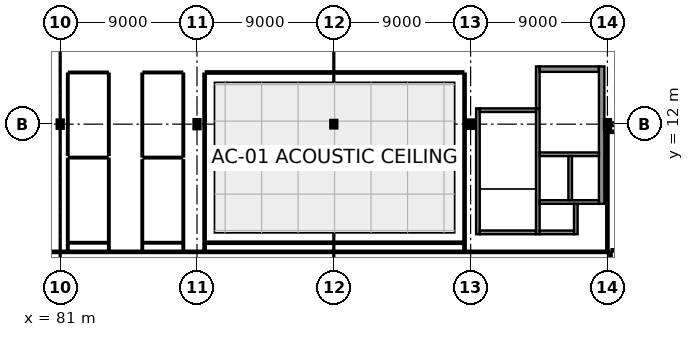
"""IFC4 building model, lengths in metres.
Left out: names, types, materials, properties, quantities, classifications, styles, units other than length and angle.
Written with IfcOpenShell. Run it as: python <this file> out.ifc"""

import sys

from ifc_helpers import new_model, si_unit, direction, frame, frame_2d, origin, origin_2d, place, context, subcontext, project, spatial, rectangle, i_section, extrude, element, fill, save


model = new_model("IFC4")
c1 = context("Model", 3, precision=1e-05, world=origin(), true_north=direction((0.0, 1.0)))
c2 = subcontext(c1, "Body", "Model", "MODEL_VIEW")
j1 = project(units=[si_unit("LENGTHUNIT", "METRE"), si_unit("PLANEANGLEUNIT", "RADIAN")], contexts=[c1])
p1 = place(None, origin())
s1 = spatial("IfcSite", under=j1, at=p1, CompositionType="ELEMENT")
p2 = place(p1, origin())
s2 = spatial("IfcBuilding", under=s1, at=p2, CompositionType="ELEMENT")
p3 = place(p2, frame((0.0, 0.0, 5.4)))
s3 = spatial("IfcBuildingStorey", under=s2, at=p3, CompositionType="ELEMENT", Elevation=5.4)
p4 = place(p3, frame((81.0, 12.0, 0.0), z_axis=(0.0, 0.0, 1.0), x_axis=(1.0, 0.0, 0.0)))
e1 = element("IfcColumn", 1, at=p4, inside=s3, PredefinedType="COLUMN", context=c2, shape_type="SweptSolid", body=[
    extrude(i_section(OverallWidth=0.3, OverallDepth=0.45, WebThickness=0.014, FlangeThickness=0.026, at=origin_2d()), origin(), (0.0, 0.0, 1.0), 4.5),
])
p5 = place(p3, frame((90.0, 12.0, 0.0), z_axis=(0.0, 0.0, 1.0), x_axis=(1.0, 0.0, 0.0)))
e2 = element("IfcColumn", 2, at=p5, inside=s3, PredefinedType="COLUMN", context=c2, shape_type="SweptSolid", body=[
    extrude(i_section(OverallWidth=0.3, OverallDepth=0.5, WebThickness=0.014, FlangeThickness=0.028, at=origin_2d()), origin(), (0.0, 0.0, 1.0), 4.5),
])
p6 = place(p3, frame((99.0, 12.0, 0.0), z_axis=(0.0, 0.0, 1.0), x_axis=(1.0, 0.0, 0.0)))
e3 = element("IfcColumn", 3, at=p6, inside=s3, PredefinedType="COLUMN", context=c2, shape_type="SweptSolid", body=[
    extrude(i_section(OverallWidth=0.3, OverallDepth=0.4, WebThickness=0.013, FlangeThickness=0.024, at=origin_2d()), origin(), (0.0, 0.0, 1.0), 4.5),
])
p7 = place(p3, frame((108.0, 12.0, 0.0), z_axis=(0.0, 0.0, 1.0), x_axis=(1.0, 0.0, 0.0)))
e4 = element("IfcColumn", 4, at=p7, inside=s3, PredefinedType="COLUMN", context=c2, shape_type="SweptSolid", body=[
    extrude(i_section(OverallWidth=0.3, OverallDepth=0.45, WebThickness=0.014, FlangeThickness=0.026, at=origin_2d()), origin(), (0.0, 0.0, 1.0), 4.5),
])
p8 = place(p3, frame((117.0, 12.0, 0.0), z_axis=(0.0, 0.0, 1.0), x_axis=(0.0, 1.0, 0.0)))
e5 = element("IfcColumn", 5, at=p8, inside=s3, PredefinedType="COLUMN", context=c2, shape_type="SweptSolid", body=[
    extrude(i_section(OverallWidth=0.3, OverallDepth=0.5, WebThickness=0.014, FlangeThickness=0.028, at=origin_2d()), origin(), (0.0, 0.0, 1.0), 4.5),
])
p9 = place(p3, frame((108.48, 4.76, 0.0), z_axis=(0.0, 0.0, 1.0), x_axis=(0.0, 1.0, 0.0)))
e6 = element("IfcWall", 6, at=p9, inside=s3, PredefinedType="SHEAR", context=c2, shape_type="SweptSolid", body=[
    extrude(rectangle(XDim=8.28, YDim=0.24, at=frame_2d((4.14, 0.0))), origin(), (0.0, 0.0, 1.0), 4.31),
])
p10 = place(p3, frame((112.42, 4.76, 0.0), z_axis=(0.0, 0.0, 1.0), x_axis=(0.0, 1.0, 0.0)))
e7 = element("IfcWall", 7, at=p10, inside=s3, PredefinedType="SHEAR", context=c2, shape_type="SweptSolid", body=[
    extrude(rectangle(XDim=8.28, YDim=0.24, at=frame_2d((4.14, 0.0))), origin(), (0.0, 0.0, 1.0), 4.31),
])
p11 = place(p10, frame((6.49, 0.0, 0.0)))
e8 = element("IfcOpeningElement", 8, at=p11, cuts=e7, PredefinedType="OPENING", context=c2, shape_type="SweptSolid", body=[
    extrude(rectangle(XDim=1.3, YDim=2.2, at=frame_2d((0.65, 1.1))), frame((0.0, 0.135, 0.0), z_axis=(0.0, -1.0, 0.0), x_axis=(1.0, 0.0, 0.0)), (0.0, 0.0, 1.0), 0.27),
])
for number, where, z_axis, x_axis in (
    (9, (108.6, 4.88, 0.0), (0.0, 0.0, 1.0), (1.0, 0.0, 0.0)),
    (10, (108.6, 12.92, 0.0), (0.0, 0.0, 1.0), (1.0, 0.0, 0.0)),
):
    element("IfcWall", number, at=place(p3, frame(where, z_axis=z_axis, x_axis=x_axis)), inside=s3, PredefinedType="SHEAR", context=c2, shape_type="SweptSolid", body=[
        extrude(rectangle(XDim=3.7, YDim=0.24, at=frame_2d((1.85, 0.0))), origin(), (0.0, 0.0, 1.0), 4.31),
    ])
p12 = place(p3, frame((112.42, 13.04, 0.0), z_axis=(0.0, 0.0, 1.0), x_axis=(0.0, 1.0, 0.0)))
e11 = element("IfcWall", 11, at=p12, inside=s3, PredefinedType="SHEAR", context=c2, shape_type="SweptSolid", body=[
    extrude(rectangle(XDim=2.76, YDim=0.24, at=frame_2d((1.38, 0.0))), origin(), (0.0, 0.0, 1.0), 4.16),
])
p13 = place(p3, frame((112.54, 15.62, 0.0), z_axis=(0.0, 0.0, 1.0), x_axis=(1.0, 0.0, 0.0)))
e12 = element("IfcWall", 12, at=p13, inside=s3, PredefinedType="SHEAR", context=c2, shape_type="SweptSolid", body=[
    extrude(rectangle(XDim=3.9, YDim=0.36, at=frame_2d((1.95, 0.0))), origin(), (0.0, 0.0, 1.0), 4.16),
])
p14 = place(p13, frame((1.15, 0.0, 0.0)))
e13 = element("IfcOpeningElement", 13, at=p14, cuts=e12, PredefinedType="OPENING", context=c2, shape_type="SweptSolid", body=[
    extrude(rectangle(XDim=1.6, YDim=2.25, at=frame_2d((0.8, 1.125))), frame((0.0, 0.195, 0.0), z_axis=(0.0, -1.0, 0.0), x_axis=(1.0, 0.0, 0.0)), (0.0, 0.0, 1.0), 0.39),
])
p15 = place(p3, frame((116.62, 6.76, 0.0), z_axis=(0.0, 0.0, 1.0), x_axis=(0.0, 1.0, 0.0)))
e14 = element("IfcWall", 14, at=p15, inside=s3, PredefinedType="SHEAR", context=c2, shape_type="SweptSolid", body=[
    extrude(rectangle(XDim=9.04, YDim=0.36, at=frame_2d((4.52, 0.0))), origin(), (0.0, 0.0, 1.0), 4.16),
])
p16 = place(p3, frame((112.54, 10.02, 0.0), z_axis=(0.0, 0.0, 1.0), x_axis=(1.0, 0.0, 0.0)))
e15 = element("IfcWall", 15, at=p16, inside=s3, PredefinedType="SHEAR", context=c2, shape_type="SweptSolid", body=[
    extrude(rectangle(XDim=3.9, YDim=0.24, at=frame_2d((1.95, 0.0))), origin(), (0.0, 0.0, 1.0), 4.31),
])
p17 = place(p16, frame((0.235, 0.0, 0.0)))
e16 = element("IfcOpeningElement", 16, at=p17, cuts=e15, PredefinedType="OPENING", context=c2, shape_type="SweptSolid", body=[
    extrude(rectangle(XDim=1.6, YDim=2.3, at=frame_2d((0.8, 1.15))), frame((0.0, 0.135, 0.0), z_axis=(0.0, -1.0, 0.0), x_axis=(1.0, 0.0, 0.0)), (0.0, 0.0, 1.0), 0.27),
])
p18 = place(p16, frame((2.185, 0.0, 0.0)))
e17 = element("IfcOpeningElement", 17, at=p18, cuts=e15, PredefinedType="OPENING", context=c2, shape_type="SweptSolid", body=[
    extrude(rectangle(XDim=1.6, YDim=2.3, at=frame_2d((0.8, 1.15))), frame((0.0, 0.135, 0.0), z_axis=(0.0, -1.0, 0.0), x_axis=(1.0, 0.0, 0.0)), (0.0, 0.0, 1.0), 0.27),
])
p19 = place(p3, frame((112.54, 6.88, 0.0), z_axis=(0.0, 0.0, 1.0), x_axis=(1.0, 0.0, 0.0)))
e18 = element("IfcWall", 18, at=p19, inside=s3, PredefinedType="SHEAR", context=c2, shape_type="SweptSolid", body=[
    extrude(rectangle(XDim=3.9, YDim=0.24, at=frame_2d((1.95, 0.0))), origin(), (0.0, 0.0, 1.0), 4.31),
])
p20 = place(p3, frame((114.55, 7.0, 0.0), z_axis=(0.0, 0.0, 1.0), x_axis=(0.0, 1.0, 0.0)))
e19 = element("IfcWall", 19, at=p20, inside=s3, PredefinedType="SHEAR", context=c2, shape_type="SweptSolid", body=[
    extrude(rectangle(XDim=2.9, YDim=0.24, at=frame_2d((1.45, 0.0))), origin(), (0.0, 0.0, 1.0), 4.31),
])
p21 = place(p3, frame((114.92, 4.76, 0.0), z_axis=(0.0, 0.0, 1.0), x_axis=(0.0, 1.0, 0.0)))
e20 = element("IfcWall", 20, at=p21, inside=s3, PredefinedType="SHEAR", context=c2, shape_type="SweptSolid", body=[
    extrude(rectangle(XDim=2.0, YDim=0.24, at=frame_2d((1.0, 0.0))), origin(), (0.0, 0.0, 1.0), 4.31),
])
p22 = place(p3, frame((112.54, 4.88, 0.0), z_axis=(0.0, 0.0, 1.0), x_axis=(1.0, 0.0, 0.0)))
e21 = element("IfcWall", 21, at=p22, inside=s3, PredefinedType="SHEAR", context=c2, shape_type="SweptSolid", body=[
    extrude(rectangle(XDim=2.26, YDim=0.24, at=frame_2d((1.13, 0.0))), origin(), (0.0, 0.0, 1.0), 4.31),
])
p23 = place(p3, frame((117.248, 12.0, 0.0), z_axis=(0.0, 0.0, 1.0), x_axis=(1.0, 0.0, 0.0)))
e22 = element("IfcWall", 22, at=p23, inside=s3, PredefinedType="SHEAR", context=c2, shape_type="SweptSolid", body=[
    extrude(rectangle(XDim=8.744, YDim=0.24, at=frame_2d((4.372, 0.0))), origin(), (0.0, 0.0, 1.0), 3.585),
])
p24 = place(p3, frame((46.08, 3.6, 0.0), z_axis=(0.0, 0.0, 1.0), x_axis=(1.0, 0.0, 0.0)))
e23 = element("IfcWall", 23, at=p24, inside=s3, PredefinedType="PARTITIONING", context=c2, shape_type="SweptSolid", body=[
    extrude(rectangle(XDim=71.04, YDim=0.15, at=frame_2d((35.52, 0.0))), origin(), (0.0, 0.0, 1.0), 4.14),
])
p25 = place(p24, frame((31.995, 0.0, 0.0)))
e24 = element("IfcOpeningElement", 24, at=p25, cuts=e23, PredefinedType="OPENING", context=c2, shape_type="SweptSolid", body=[
    extrude(rectangle(XDim=1.05, YDim=2.25, at=frame_2d((0.525, 1.125))), frame((0.0, 0.09, 0.0), z_axis=(0.0, -1.0, 0.0), x_axis=(1.0, 0.0, 0.0)), (0.0, 0.0, 1.0), 0.18),
])
p26 = place(p24, frame((68.39, 0.0, 1.05)))
e25 = element("IfcOpeningElement", 25, at=p26, cuts=e23, PredefinedType="OPENING", context=c2, shape_type="SweptSolid", body=[
    extrude(rectangle(XDim=1.8, YDim=1.1, at=frame_2d((0.9, 0.55))), frame((0.0, 0.09, 0.0), z_axis=(0.0, -1.0, 0.0), x_axis=(1.0, 0.0, 0.0)), (0.0, 0.0, 1.0), 0.18),
])
p27 = place(p3, frame((117.2, 3.52, 0.0), z_axis=(0.0, 0.0, 1.0), x_axis=(0.0, -1.0, 0.0)))
e26 = element("IfcWall", 26, at=p27, inside=s3, PredefinedType="PARTITIONING", context=c2, shape_type="SweptSolid", body=[
    extrude(rectangle(XDim=3.297, YDim=0.15, at=frame_2d((1.648, 0.0))), origin(), (0.0, 0.0, 1.0), 3.685),
])
p28 = place(p3, frame((134.855, 3.7, 0.0), z_axis=(0.0, 0.0, 1.0), x_axis=(-1.0, 0.0, 0.0)))
e27 = element("IfcWall", 27, at=p28, inside=s3, PredefinedType="PARTITIONING", context=c2, shape_type="SweptSolid", body=[
    extrude(rectangle(XDim=17.575, YDim=0.15, at=frame_2d((8.788, 0.0))), origin(), (0.0, 0.0, 1.0), 4.14),
])
p29 = place(p3, frame((117.0, 3.67, 0.0), z_axis=(0.0, 0.0, 1.0), x_axis=(0.0, 1.0, 0.0)))
e28 = element("IfcWall", 28, at=p29, inside=s3, PredefinedType="PARTITIONING", context=c2, shape_type="SweptSolid", body=[
    extrude(rectangle(XDim=7.75, YDim=0.15, at=frame_2d((3.875, 0.0))), origin(), (0.0, 0.0, 1.0), 3.685),
])
p30 = place(p3, frame((116.795, 11.5, 0.0), z_axis=(0.0, 0.0, 1.0), x_axis=(1.0, 0.0, 0.0)))
e29 = element("IfcWall", 29, at=p30, inside=s3, PredefinedType="PARTITIONING", context=c2, shape_type="SweptSolid", body=[
    extrude(rectangle(XDim=9.425, YDim=0.15, at=frame_2d((4.712, 0.0))), origin(), (0.0, 0.0, 1.0), 4.14),
])
p31 = place(p3, frame((84.2, 9.72, 0.0), z_axis=(0.0, 0.0, 1.0), x_axis=(0.0, -1.0, 0.0)))
e30 = element("IfcWall", 30, at=p31, inside=s3, PredefinedType="PARTITIONING", context=c2, shape_type="SweptSolid", body=[
    extrude(rectangle(XDim=6.05, YDim=0.1, at=frame_2d((3.025, 0.0))), origin(), (0.0, 0.0, 1.0), 4.14),
])
p32 = place(p31, frame((2.529, 0.0, 0.0)))
e31 = element("IfcOpeningElement", 31, at=p32, cuts=e30, PredefinedType="OPENING", context=c2, shape_type="SweptSolid", body=[
    extrude(rectangle(XDim=0.9, YDim=2.05, at=frame_2d((0.45, 1.025))), frame((0.0, 0.065, 0.0), z_axis=(0.0, -1.0, 0.0), x_axis=(1.0, 0.0, 0.0)), (0.0, 0.0, 1.0), 0.13),
])
p33 = place(p3, frame((84.155, 4.2, 0.0), z_axis=(0.0, 0.0, 1.0), x_axis=(-1.0, 0.0, 0.0)))
e32 = element("IfcWall", 32, at=p33, inside=s3, PredefinedType="PARTITIONING", context=c2, shape_type="SweptSolid", body=[
    extrude(rectangle(XDim=2.575, YDim=0.1, at=frame_2d((1.288, 0.0))), origin(), (0.0, 0.0, 1.0), 4.14),
])
p34 = place(p3, frame((81.5, 3.67, 0.0), z_axis=(0.0, 0.0, 1.0), x_axis=(0.0, 1.0, 0.0)))
e33 = element("IfcWall", 33, at=p34, inside=s3, PredefinedType="PARTITIONING", context=c2, shape_type="SweptSolid", body=[
    extrude(rectangle(XDim=6.05, YDim=0.1, at=frame_2d((3.025, 0.0))), origin(), (0.0, 0.0, 1.0), 3.695),
])
p35 = place(p3, frame((81.58, 9.8, 0.0), z_axis=(0.0, 0.0, 1.0), x_axis=(1.0, 0.0, 0.0)))
e34 = element("IfcWall", 34, at=p35, inside=s3, PredefinedType="PARTITIONING", context=c2, shape_type="SweptSolid", body=[
    extrude(rectangle(XDim=2.54, YDim=0.1, at=frame_2d((1.27, 0.0))), origin(), (0.0, 0.0, 1.0), 4.14),
])
p36 = place(p3, frame((81.5, 9.98, 0.0), z_axis=(0.0, 0.0, 1.0), x_axis=(0.0, 1.0, 0.0)))
e35 = element("IfcWall", 35, at=p36, inside=s3, PredefinedType="PARTITIONING", context=c2, shape_type="SweptSolid", body=[
    extrude(rectangle(XDim=5.34, YDim=0.1, at=frame_2d((2.67, 0.0))), origin(), (0.0, 0.0, 1.0), 3.695),
])
p37 = place(p3, frame((81.58, 15.4, 0.0), z_axis=(0.0, 0.0, 1.0), x_axis=(1.0, 0.0, 0.0)))
e36 = element("IfcWall", 36, at=p37, inside=s3, PredefinedType="PARTITIONING", context=c2, shape_type="SweptSolid", body=[
    extrude(rectangle(XDim=2.54, YDim=0.1, at=frame_2d((1.27, 0.0))), origin(), (0.0, 0.0, 1.0), 4.14),
])
p38 = place(p3, frame((84.2, 15.32, 0.0), z_axis=(0.0, 0.0, 1.0), x_axis=(0.0, -1.0, 0.0)))
e37 = element("IfcWall", 37, at=p38, inside=s3, PredefinedType="PARTITIONING", context=c2, shape_type="SweptSolid", body=[
    extrude(rectangle(XDim=5.34, YDim=0.1, at=frame_2d((2.67, 0.0))), origin(), (0.0, 0.0, 1.0), 4.14),
])
p39 = place(p38, frame((2.22, 0.0, 0.0)))
e38 = element("IfcOpeningElement", 38, at=p39, cuts=e37, PredefinedType="OPENING", context=c2, shape_type="SweptSolid", body=[
    extrude(rectangle(XDim=0.9, YDim=2.05, at=frame_2d((0.45, 1.025))), frame((0.0, 0.065, 0.0), z_axis=(0.0, -1.0, 0.0), x_axis=(1.0, 0.0, 0.0)), (0.0, 0.0, 1.0), 0.13),
])
p40 = place(p3, frame((86.4, 9.88, 0.0), z_axis=(0.0, 0.0, 1.0), x_axis=(0.0, 1.0, 0.0)))
e39 = element("IfcWall", 39, at=p40, inside=s3, PredefinedType="PARTITIONING", context=c2, shape_type="SweptSolid", body=[
    extrude(rectangle(XDim=5.44, YDim=0.1, at=frame_2d((2.72, 0.0))), origin(), (0.0, 0.0, 1.0), 4.14),
])
p41 = place(p40, frame((2.22, 0.0, 0.0)))
e40 = element("IfcOpeningElement", 40, at=p41, cuts=e39, PredefinedType="OPENING", context=c2, shape_type="SweptSolid", body=[
    extrude(rectangle(XDim=1.0, YDim=2.1, at=frame_2d((0.5, 1.05))), frame((0.0, 0.065, 0.0), z_axis=(0.0, -1.0, 0.0), x_axis=(1.0, 0.0, 0.0)), (0.0, 0.0, 1.0), 0.13),
])
p42 = place(p3, frame((86.48, 15.4, 0.0), z_axis=(0.0, 0.0, 1.0), x_axis=(1.0, 0.0, 0.0)))
e41 = element("IfcWall", 41, at=p42, inside=s3, PredefinedType="PARTITIONING", context=c2, shape_type="SweptSolid", body=[
    extrude(rectangle(XDim=2.54, YDim=0.1, at=frame_2d((1.27, 0.0))), origin(), (0.0, 0.0, 1.0), 4.14),
])
p43 = place(p3, frame((89.1, 15.32, 0.0), z_axis=(0.0, 0.0, 1.0), x_axis=(0.0, -1.0, 0.0)))
e42 = element("IfcWall", 42, at=p43, inside=s3, PredefinedType="PARTITIONING", context=c2, shape_type="SweptSolid", body=[
    extrude(rectangle(XDim=5.44, YDim=0.1, at=frame_2d((2.72, 0.0))), origin(), (0.0, 0.0, 1.0), 4.14),
])
p44 = place(p3, frame((89.02, 9.8, 0.0), z_axis=(0.0, 0.0, 1.0), x_axis=(-1.0, 0.0, 0.0)))
e43 = element("IfcWall", 43, at=p44, inside=s3, PredefinedType="PARTITIONING", context=c2, shape_type="SweptSolid", body=[
    extrude(rectangle(XDim=2.54, YDim=0.1, at=frame_2d((1.27, 0.0))), origin(), (0.0, 0.0, 1.0), 4.14),
])
p45 = place(p3, frame((89.1, 9.62, 0.0), z_axis=(0.0, 0.0, 1.0), x_axis=(0.0, -1.0, 0.0)))
e44 = element("IfcWall", 44, at=p45, inside=s3, PredefinedType="PARTITIONING", context=c2, shape_type="SweptSolid", body=[
    extrude(rectangle(XDim=5.95, YDim=0.1, at=frame_2d((2.975, 0.0))), origin(), (0.0, 0.0, 1.0), 4.14),
])
p46 = place(p3, frame((89.055, 4.2, 0.0), z_axis=(0.0, 0.0, 1.0), x_axis=(-1.0, 0.0, 0.0)))
e45 = element("IfcWall", 45, at=p46, inside=s3, PredefinedType="PARTITIONING", context=c2, shape_type="SweptSolid", body=[
    extrude(rectangle(XDim=2.575, YDim=0.1, at=frame_2d((1.288, 0.0))), origin(), (0.0, 0.0, 1.0), 4.14),
])
p47 = place(p3, frame((86.4, 3.67, 0.0), z_axis=(0.0, 0.0, 1.0), x_axis=(0.0, 1.0, 0.0)))
e46 = element("IfcWall", 46, at=p47, inside=s3, PredefinedType="PARTITIONING", context=c2, shape_type="SweptSolid", body=[
    extrude(rectangle(XDim=5.95, YDim=0.1, at=frame_2d((2.975, 0.0))), origin(), (0.0, 0.0, 1.0), 4.14),
])
p48 = place(p47, frame((2.571, 0.0, 0.0)))
e47 = element("IfcOpeningElement", 47, at=p48, cuts=e46, PredefinedType="OPENING", context=c2, shape_type="SweptSolid", body=[
    extrude(rectangle(XDim=0.9, YDim=2.05, at=frame_2d((0.45, 1.025))), frame((0.0, 0.065, 0.0), z_axis=(0.0, -1.0, 0.0), x_axis=(1.0, 0.0, 0.0)), (0.0, 0.0, 1.0), 0.13),
])
p49 = place(p3, frame((107.6, 15.32, 0.0), z_axis=(0.0, 0.0, 1.0), x_axis=(0.0, -1.0, 0.0)))
e48 = element("IfcWall", 48, at=p49, inside=s3, PredefinedType="PARTITIONING", context=c2, shape_type="SweptSolid", body=[
    extrude(rectangle(XDim=11.65, YDim=0.15, at=frame_2d((5.825, 0.0))), origin(), (0.0, 0.0, 1.0), 4.14),
])
p50 = place(p3, frame((107.53, 4.2, 0.0), z_axis=(0.0, 0.0, 1.0), x_axis=(-1.0, 0.0, 0.0)))
e49 = element("IfcWall", 49, at=p50, inside=s3, PredefinedType="PARTITIONING", context=c2, shape_type="SweptSolid", body=[
    extrude(rectangle(XDim=16.95, YDim=0.15, at=frame_2d((8.475, 0.0))), origin(), (0.0, 0.0, 1.0), 4.14),
])
p51 = place(p3, frame((90.5, 3.67, 0.0), z_axis=(0.0, 0.0, 1.0), x_axis=(0.0, 1.0, 0.0)))
e50 = element("IfcWall", 50, at=p51, inside=s3, PredefinedType="PARTITIONING", context=c2, shape_type="SweptSolid", body=[
    extrude(rectangle(XDim=11.65, YDim=0.15, at=frame_2d((5.825, 0.0))), origin(), (0.0, 0.0, 1.0), 4.14),
])
p52 = place(p3, frame((90.58, 15.4, 0.0), z_axis=(0.0, 0.0, 1.0), x_axis=(1.0, 0.0, 0.0)))
e51 = element("IfcWall", 51, at=p52, inside=s3, PredefinedType="PARTITIONING", context=c2, shape_type="SweptSolid", body=[
    extrude(rectangle(XDim=16.94, YDim=0.15, at=frame_2d((8.47, 0.0))), origin(), (0.0, 0.0, 1.0), 4.14),
])
p53 = place(p52, frame((7.945, 0.0, 0.0)))
e52 = element("IfcOpeningElement", 52, at=p53, cuts=e51, PredefinedType="OPENING", context=c2, shape_type="SweptSolid", body=[
    extrude(rectangle(XDim=1.05, YDim=2.25, at=frame_2d((0.525, 1.125))), frame((0.0, 0.09, 0.0), z_axis=(0.0, -1.0, 0.0), x_axis=(1.0, 0.0, 0.0)), (0.0, 0.0, 1.0), 0.18),
])
p54 = place(p11, frame((1.3, 0.0, 0.0), z_axis=(0.0, 0.0, 1.0), x_axis=(-1.0, 0.0, 0.0)))
e53 = element("IfcDoor", 53, at=p54, inside=s3, OperationType="SINGLE_SWING_LEFT", PredefinedType="DOOR", context=c2, shape_type="SweptSolid", body=[
    extrude(rectangle(XDim=1.3, YDim=2.2, at=frame_2d((0.65, 1.1))), frame((0.0, 0.025, 0.0), z_axis=(0.0, -1.0, 0.0), x_axis=(1.0, 0.0, 0.0)), (0.0, 0.0, 1.0), 0.05),
])
fill(e8, e53)
p55 = place(p14, origin())
e54 = element("IfcDoor", 54, at=p55, inside=s3, OperationType="DOUBLE_DOOR_SINGLE_SWING", PredefinedType="DOOR", context=c2, shape_type="SweptSolid", body=[
    extrude(rectangle(XDim=1.6, YDim=2.25, at=frame_2d((0.8, 1.125))), frame((0.0, 0.025, 0.0), z_axis=(0.0, -1.0, 0.0), x_axis=(1.0, 0.0, 0.0)), (0.0, 0.0, 1.0), 0.05),
])
fill(e13, e54)
p56 = place(p17, origin())
e55 = element("IfcDoor", 55, at=p56, inside=s3, OperationType="DOUBLE_DOOR_SLIDING", PredefinedType="DOOR", context=c2, shape_type="SweptSolid", body=[
    extrude(rectangle(XDim=1.6, YDim=2.3, at=frame_2d((0.8, 1.15))), frame((0.0, 0.025, 0.0), z_axis=(0.0, -1.0, 0.0), x_axis=(1.0, 0.0, 0.0)), (0.0, 0.0, 1.0), 0.05),
])
fill(e16, e55)
p57 = place(p18, origin())
e56 = element("IfcDoor", 56, at=p57, inside=s3, OperationType="DOUBLE_DOOR_SLIDING", PredefinedType="DOOR", context=c2, shape_type="SweptSolid", body=[
    extrude(rectangle(XDim=1.6, YDim=2.3, at=frame_2d((0.8, 1.15))), frame((0.0, 0.025, 0.0), z_axis=(0.0, -1.0, 0.0), x_axis=(1.0, 0.0, 0.0)), (0.0, 0.0, 1.0), 0.05),
])
fill(e17, e56)
p58 = place(p26, origin())
e57 = element("IfcWindow", 57, at=p58, inside=s3, PartitioningType="SINGLE_PANEL", PredefinedType="WINDOW", context=c2, shape_type="SweptSolid", body=[
    extrude(rectangle(XDim=1.8, YDim=1.1, at=frame_2d((0.9, 0.55))), frame((0.0, 0.03, 0.0), z_axis=(0.0, -1.0, 0.0), x_axis=(1.0, 0.0, 0.0)), (0.0, 0.0, 1.0), 0.06),
])
fill(e25, e57)
p59 = place(p32, frame((0.9, 0.0, 0.0), z_axis=(0.0, 0.0, 1.0), x_axis=(-1.0, 0.0, 0.0)))
e58 = element("IfcDoor", 58, at=p59, inside=s3, OperationType="SINGLE_SWING_RIGHT", PredefinedType="DOOR", context=c2, shape_type="SweptSolid", body=[
    extrude(rectangle(XDim=0.9, YDim=2.05, at=frame_2d((0.45, 1.025))), frame((0.0, 0.025, 0.0), z_axis=(0.0, -1.0, 0.0), x_axis=(1.0, 0.0, 0.0)), (0.0, 0.0, 1.0), 0.05),
])
fill(e31, e58)
p60 = place(p39, origin())
e59 = element("IfcDoor", 59, at=p60, inside=s3, OperationType="SINGLE_SWING_LEFT", PredefinedType="DOOR", context=c2, shape_type="SweptSolid", body=[
    extrude(rectangle(XDim=0.9, YDim=2.05, at=frame_2d((0.45, 1.025))), frame((0.0, 0.025, 0.0), z_axis=(0.0, -1.0, 0.0), x_axis=(1.0, 0.0, 0.0)), (0.0, 0.0, 1.0), 0.05),
])
fill(e38, e59)
p61 = place(p41, frame((1.0, 0.0, 0.0), z_axis=(0.0, 0.0, 1.0), x_axis=(-1.0, 0.0, 0.0)))
e60 = element("IfcDoor", 60, at=p61, inside=s3, OperationType="SINGLE_SWING_RIGHT", PredefinedType="DOOR", context=c2, shape_type="SweptSolid", body=[
    extrude(rectangle(XDim=1.0, YDim=2.1, at=frame_2d((0.5, 1.05))), frame((0.0, 0.025, 0.0), z_axis=(0.0, -1.0, 0.0), x_axis=(1.0, 0.0, 0.0)), (0.0, 0.0, 1.0), 0.05),
])
fill(e40, e60)
p62 = place(p48, origin())
e61 = element("IfcDoor", 61, at=p62, inside=s3, OperationType="SINGLE_SWING_LEFT", PredefinedType="DOOR", context=c2, shape_type="SweptSolid", body=[
    extrude(rectangle(XDim=0.9, YDim=2.05, at=frame_2d((0.45, 1.025))), frame((0.0, 0.025, 0.0), z_axis=(0.0, -1.0, 0.0), x_axis=(1.0, 0.0, 0.0)), (0.0, 0.0, 1.0), 0.05),
])
fill(e47, e61)
p63 = place(p53, frame((1.05, 0.0, 0.0), z_axis=(0.0, 0.0, 1.0), x_axis=(-1.0, 0.0, 0.0)))
e62 = element("IfcDoor", 62, at=p63, inside=s3, OperationType="SINGLE_SWING_RIGHT", PredefinedType="DOOR", context=c2, shape_type="SweptSolid", body=[
    extrude(rectangle(XDim=1.05, YDim=2.25, at=frame_2d((0.525, 1.125))), frame((0.0, 0.025, 0.0), z_axis=(0.0, -1.0, 0.0), x_axis=(1.0, 0.0, 0.0)), (0.0, 0.0, 1.0), 0.05),
])
fill(e52, e62)
save(model, sys.argv[1])
